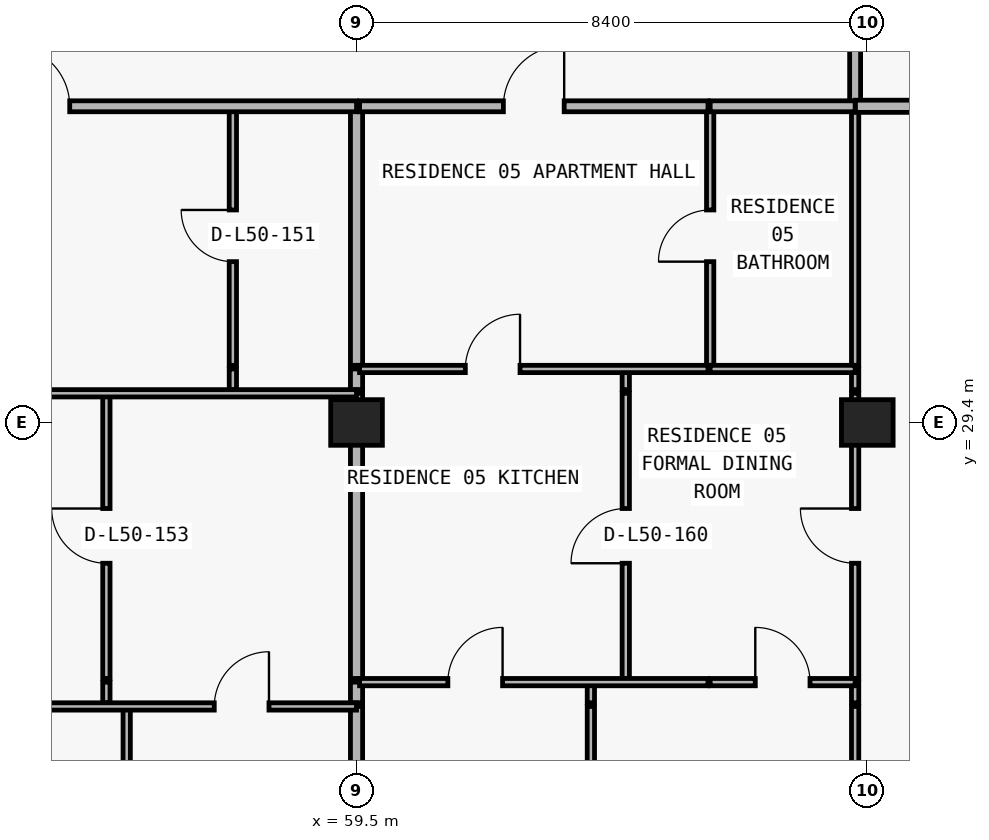
"""IFC4 building model, lengths in metres.
Left out: names, types, materials, properties, quantities, classifications, styles, units other than length and angle.
Written with IfcOpenShell. Run it as: python <this file> out.ifc"""

import sys

from ifc_helpers import new_model, si_unit, direction, frame, frame_2d, origin, origin_2d, place, context, subcontext, project, spatial, rectangle, extrude, element, fill, save


model = new_model("IFC4")
c1 = context("Model", 3, precision=1e-05, world=origin(), true_north=direction((0.0, 1.0)))
c2 = subcontext(c1, "Body", "Model", "MODEL_VIEW")
j1 = project(units=[si_unit("LENGTHUNIT", "METRE"), si_unit("PLANEANGLEUNIT", "RADIAN")], contexts=[c1])
p1 = place(None, origin())
s1 = spatial("IfcSite", under=j1, at=p1, CompositionType="ELEMENT")
p2 = place(p1, origin())
s2 = spatial("IfcBuilding", under=s1, at=p2, CompositionType="ELEMENT")
p3 = place(p2, frame((0.0, 0.0, 180.3)))
s3 = spatial("IfcBuildingStorey", under=s2, at=p3, CompositionType="ELEMENT", Elevation=180.3)
for number, where, z_axis, x_axis in (
    (1, (59.5, 29.4, 0.0), (0.0, 0.0, 1.0), (1.0, 0.0, 0.0)),
    (2, (67.9, 29.4, 0.0), (0.0, 0.0, 1.0), (1.0, 0.0, 0.0)),
):
    element("IfcColumn", number, at=place(p3, frame(where, z_axis=z_axis, x_axis=x_axis)), inside=s3, PredefinedType="COLUMN", context=c2, shape_type="SweptSolid", body=[
        extrude(rectangle(XDim=0.85, YDim=0.75, at=origin_2d()), origin(), (0.0, 0.0, 1.0), 3.0),
    ])
p4 = place(p3, frame((55.386, 24.79, 0.0), z_axis=(0.0, 0.0, 1.0), x_axis=(0.0, 1.0, 0.0)))
e3 = element("IfcWall", 3, at=p4, inside=s3, PredefinedType="PARTITIONING", context=c2, shape_type="SweptSolid", body=[
    extrude(rectangle(XDim=0.34, YDim=0.12, at=frame_2d((0.17, 0.0))), origin(), (0.0, 0.0, 1.0), 3.0),
])
p5 = place(p3, frame((55.386, 25.19, 0.0), z_axis=(0.0, 0.0, 1.0), x_axis=(0.0, 1.0, 0.0)))
e4 = element("IfcWall", 4, at=p5, inside=s3, PredefinedType="PARTITIONING", context=c2, shape_type="SweptSolid", body=[
    extrude(rectangle(XDim=4.69, YDim=0.12, at=frame_2d((2.345, 0.0))), origin(), (0.0, 0.0, 1.0), 2.675),
])
p6 = place(p5, frame((1.895, 0.0, 0.0)))
e5 = element("IfcOpeningElement", 5, at=p6, cuts=e4, PredefinedType="OPENING", context=c2, shape_type="SweptSolid", body=[
    extrude(rectangle(XDim=0.9, YDim=2.15, at=frame_2d((0.45, 1.075))), frame((0.0, 0.07, 0.0), z_axis=(0.0, -1.0, 0.0), x_axis=(1.0, 0.0, 0.0)), (0.0, 0.0, 1.0), 0.14),
])
p7 = place(p3, frame((55.72, 11.24, 0.0), z_axis=(0.0, 0.0, 1.0), x_axis=(0.0, 1.0, 0.0)))
e6 = element("IfcWall", 6, at=p7, inside=s3, PredefinedType="PARTITIONING", context=c2, shape_type="SweptSolid", body=[
    extrude(rectangle(XDim=13.49, YDim=0.12, at=frame_2d((6.745, 0.0))), origin(), (0.0, 0.0, 1.0), 3.0),
])
p8 = place(p3, frame((57.466, 29.94, 0.0), z_axis=(0.0, 0.0, 1.0), x_axis=(0.0, 1.0, 0.0)))
e7 = element("IfcWall", 7, at=p8, inside=s3, PredefinedType="PARTITIONING", context=c2, shape_type="SweptSolid", body=[
    extrude(rectangle(XDim=0.34, YDim=0.12, at=frame_2d((0.17, 0.0))), origin(), (0.0, 0.0, 1.0), 3.0),
])
p9 = place(p3, frame((57.466, 30.34, 0.0), z_axis=(0.0, 0.0, 1.0), x_axis=(0.0, 1.0, 0.0)))
e8 = element("IfcWall", 8, at=p9, inside=s3, PredefinedType="PARTITIONING", context=c2, shape_type="SweptSolid", body=[
    extrude(rectangle(XDim=4.26, YDim=0.12, at=frame_2d((2.13, 0.0))), origin(), (0.0, 0.0, 1.0), 3.0),
])
p10 = place(p9, frame((1.705, 0.0, 0.0)))
e9 = element("IfcOpeningElement", 9, at=p10, cuts=e8, PredefinedType="OPENING", context=c2, shape_type="SweptSolid", body=[
    extrude(rectangle(XDim=0.85, YDim=2.1, at=frame_2d((0.425, 1.05))), frame((0.0, 0.07, 0.0), z_axis=(0.0, -1.0, 0.0), x_axis=(1.0, 0.0, 0.0)), (0.0, 0.0, 1.0), 0.14),
])
p11 = place(p3, frame((59.5, 11.24, 0.0), z_axis=(0.0, 0.0, 1.0), x_axis=(0.0, 1.0, 0.0)))
e10 = element("IfcWall", 10, at=p11, inside=s3, PredefinedType="PARTITIONING", context=c2, shape_type="SweptSolid", body=[
    extrude(rectangle(XDim=13.49, YDim=0.2, at=frame_2d((6.745, 0.0))), origin(), (0.0, 0.0, 1.0), 2.213),
])
p12 = place(p3, frame((59.5, 24.79, 0.0), z_axis=(0.0, 0.0, 1.0), x_axis=(0.0, 1.0, 0.0)))
e11 = element("IfcWall", 11, at=p12, inside=s3, PredefinedType="PARTITIONING", context=c2, shape_type="SweptSolid", body=[
    extrude(rectangle(XDim=0.34, YDim=0.2, at=frame_2d((0.17, 0.0))), origin(), (0.0, 0.0, 1.0), 2.213),
])
p13 = place(p3, frame((59.5, 25.19, 0.0), z_axis=(0.0, 0.0, 1.0), x_axis=(0.0, 1.0, 0.0)))
e12 = element("IfcWall", 12, at=p13, inside=s3, PredefinedType="PARTITIONING", context=c2, shape_type="SweptSolid", body=[
    extrude(rectangle(XDim=4.69, YDim=0.2, at=frame_2d((2.345, 0.0))), origin(), (0.0, 0.0, 1.0), 2.213),
])
p14 = place(p3, frame((59.5, 29.94, 0.0), z_axis=(0.0, 0.0, 1.0), x_axis=(0.0, 1.0, 0.0)))
e13 = element("IfcWall", 13, at=p14, inside=s3, PredefinedType="PARTITIONING", context=c2, shape_type="SweptSolid", body=[
    extrude(rectangle(XDim=0.34, YDim=0.2, at=frame_2d((0.17, 0.0))), origin(), (0.0, 0.0, 1.0), 2.213),
])
p15 = place(p3, frame((59.5, 30.34, 0.0), z_axis=(0.0, 0.0, 1.0), x_axis=(0.0, 1.0, 0.0)))
e14 = element("IfcWall", 14, at=p15, inside=s3, PredefinedType="PARTITIONING", context=c2, shape_type="SweptSolid", body=[
    extrude(rectangle(XDim=4.26, YDim=0.2, at=frame_2d((2.13, 0.0))), origin(), (0.0, 0.0, 1.0), 2.213),
])
p16 = place(p3, frame((63.354, 11.24, 0.0), z_axis=(0.0, 0.0, 1.0), x_axis=(0.0, 1.0, 0.0)))
e15 = element("IfcWall", 15, at=p16, inside=s3, PredefinedType="PARTITIONING", context=c2, shape_type="SweptSolid", body=[
    extrude(rectangle(XDim=13.49, YDim=0.12, at=frame_2d((6.745, 0.0))), origin(), (0.0, 0.0, 1.0), 3.0),
])
p17 = place(p3, frame((63.354, 24.79, 0.0), z_axis=(0.0, 0.0, 1.0), x_axis=(0.0, 1.0, 0.0)))
e16 = element("IfcWall", 16, at=p17, inside=s3, PredefinedType="PARTITIONING", context=c2, shape_type="SweptSolid", body=[
    extrude(rectangle(XDim=0.34, YDim=0.12, at=frame_2d((0.17, 0.0))), origin(), (0.0, 0.0, 1.0), 3.0),
])
p18 = place(p3, frame((63.928, 25.19, 0.0), z_axis=(0.0, 0.0, 1.0), x_axis=(0.0, 1.0, 0.0)))
e17 = element("IfcWall", 17, at=p18, inside=s3, PredefinedType="PARTITIONING", context=c2, shape_type="SweptSolid", body=[
    extrude(rectangle(XDim=4.69, YDim=0.12, at=frame_2d((2.345, 0.0))), origin(), (0.0, 0.0, 1.0), 3.0),
])
p19 = place(p18, frame((1.895, 0.0, 0.0)))
e18 = element("IfcOpeningElement", 18, at=p19, cuts=e17, PredefinedType="OPENING", context=c2, shape_type="SweptSolid", body=[
    extrude(rectangle(XDim=0.9, YDim=2.15, at=frame_2d((0.45, 1.075))), frame((0.0, 0.07, 0.0), z_axis=(0.0, -1.0, 0.0), x_axis=(1.0, 0.0, 0.0)), (0.0, 0.0, 1.0), 0.14),
])
p20 = place(p3, frame((63.928, 29.94, 0.0), z_axis=(0.0, 0.0, 1.0), x_axis=(0.0, 1.0, 0.0)))
e19 = element("IfcWall", 19, at=p20, inside=s3, PredefinedType="PARTITIONING", context=c2, shape_type="SweptSolid", body=[
    extrude(rectangle(XDim=0.34, YDim=0.12, at=frame_2d((0.17, 0.0))), origin(), (0.0, 0.0, 1.0), 3.0),
])
p21 = place(p3, frame((65.316, 30.34, 0.0), z_axis=(0.0, 0.0, 1.0), x_axis=(0.0, 1.0, 0.0)))
e20 = element("IfcWall", 20, at=p21, inside=s3, PredefinedType="PARTITIONING", context=c2, shape_type="SweptSolid", body=[
    extrude(rectangle(XDim=4.26, YDim=0.12, at=frame_2d((2.13, 0.0))), origin(), (0.0, 0.0, 1.0), 3.0),
])
p22 = place(p21, frame((1.705, 0.0, 0.0)))
e21 = element("IfcOpeningElement", 21, at=p22, cuts=e20, PredefinedType="OPENING", context=c2, shape_type="SweptSolid", body=[
    extrude(rectangle(XDim=0.85, YDim=2.1, at=frame_2d((0.425, 1.05))), frame((0.0, 0.07, 0.0), z_axis=(0.0, -1.0, 0.0), x_axis=(1.0, 0.0, 0.0)), (0.0, 0.0, 1.0), 0.14),
])
p23 = place(p3, frame((67.7, 11.32, 0.0), z_axis=(0.0, 0.0, 1.0), x_axis=(0.0, 1.0, 0.0)))
e22 = element("IfcWall", 22, at=p23, inside=s3, PredefinedType="PARTITIONING", context=c2, shape_type="SweptSolid", body=[
    extrude(rectangle(XDim=13.41, YDim=0.12, at=frame_2d((6.705, 0.0))), origin(), (0.0, 0.0, 1.0), 2.213),
])
p24 = place(p3, frame((67.7, 24.79, 0.0), z_axis=(0.0, 0.0, 1.0), x_axis=(0.0, 1.0, 0.0)))
e23 = element("IfcWall", 23, at=p24, inside=s3, PredefinedType="PARTITIONING", context=c2, shape_type="SweptSolid", body=[
    extrude(rectangle(XDim=0.34, YDim=0.12, at=frame_2d((0.17, 0.0))), origin(), (0.0, 0.0, 1.0), 2.213),
])
p25 = place(p3, frame((67.7, 25.19, 0.0), z_axis=(0.0, 0.0, 1.0), x_axis=(0.0, 1.0, 0.0)))
e24 = element("IfcWall", 24, at=p25, inside=s3, PredefinedType="PARTITIONING", context=c2, shape_type="SweptSolid", body=[
    extrude(rectangle(XDim=4.69, YDim=0.12, at=frame_2d((2.345, 0.0))), origin(), (0.0, 0.0, 1.0), 2.213),
])
p26 = place(p25, frame((1.895, 0.0, 0.0)))
e25 = element("IfcOpeningElement", 25, at=p26, cuts=e24, PredefinedType="OPENING", context=c2, shape_type="SweptSolid", body=[
    extrude(rectangle(XDim=0.9, YDim=2.15, at=frame_2d((0.45, 1.075))), frame((0.0, 0.07, 0.0), z_axis=(0.0, -1.0, 0.0), x_axis=(1.0, 0.0, 0.0)), (0.0, 0.0, 1.0), 0.14),
])
p27 = place(p3, frame((67.7, 29.94, 0.0), z_axis=(0.0, 0.0, 1.0), x_axis=(0.0, 1.0, 0.0)))
e26 = element("IfcWall", 26, at=p27, inside=s3, PredefinedType="PARTITIONING", context=c2, shape_type="SweptSolid", body=[
    extrude(rectangle(XDim=0.34, YDim=0.12, at=frame_2d((0.17, 0.0))), origin(), (0.0, 0.0, 1.0), 2.213),
])
p28 = place(p3, frame((67.7, 30.34, 0.0), z_axis=(0.0, 0.0, 1.0), x_axis=(0.0, 1.0, 0.0)))
e27 = element("IfcWall", 27, at=p28, inside=s3, PredefinedType="PARTITIONING", context=c2, shape_type="SweptSolid", body=[
    extrude(rectangle(XDim=4.26, YDim=0.12, at=frame_2d((2.13, 0.0))), origin(), (0.0, 0.0, 1.0), 2.213),
])
p29 = place(p3, frame((67.7, 34.605, 0.0), z_axis=(0.0, 0.0, 1.0), x_axis=(0.0, 1.0, 0.0)))
e28 = element("IfcWall", 28, at=p29, inside=s3, PredefinedType="PARTITIONING", context=c2, shape_type="SweptSolid", body=[
    extrude(rectangle(XDim=2.345, YDim=0.18, at=frame_2d((1.172, 0.0))), origin(), (0.0, 0.0, 1.0), 2.213),
])
p30 = place(p3, frame((51.32, 24.73, 0.0), z_axis=(0.0, 0.0, 1.0), x_axis=(1.0, 0.0, 0.0)))
e29 = element("IfcWall", 29, at=p30, inside=s3, PredefinedType="PARTITIONING", context=c2, shape_type="SweptSolid", body=[
    extrude(rectangle(XDim=8.18, YDim=0.12, at=frame_2d((4.09, 0.0))), origin(), (0.0, 0.0, 1.0), 3.0),
])
p31 = place(p30, frame((1.583, 0.0, 0.0)))
e30 = element("IfcOpeningElement", 30, at=p31, cuts=e29, PredefinedType="OPENING", context=c2, shape_type="SweptSolid", body=[
    extrude(rectangle(XDim=0.9, YDim=2.15, at=frame_2d((0.45, 1.075))), frame((0.0, 0.07, 0.0), z_axis=(0.0, -1.0, 0.0), x_axis=(1.0, 0.0, 0.0)), (0.0, 0.0, 1.0), 0.14),
])
p32 = place(p30, frame((5.84, 0.0, 0.0)))
e31 = element("IfcOpeningElement", 31, at=p32, cuts=e29, PredefinedType="OPENING", context=c2, shape_type="SweptSolid", body=[
    extrude(rectangle(XDim=0.9, YDim=2.15, at=frame_2d((0.45, 1.075))), frame((0.0, 0.07, 0.0), z_axis=(0.0, -1.0, 0.0), x_axis=(1.0, 0.0, 0.0)), (0.0, 0.0, 1.0), 0.14),
])
p33 = place(p3, frame((59.55, 25.13, 0.0), z_axis=(0.0, 0.0, 1.0), x_axis=(1.0, 0.0, 0.0)))
e32 = element("IfcWall", 32, at=p33, inside=s3, PredefinedType="PARTITIONING", context=c2, shape_type="SweptSolid", body=[
    extrude(rectangle(XDim=5.73, YDim=0.12, at=frame_2d((2.865, 0.0))), origin(), (0.0, 0.0, 1.0), 3.0),
])
p34 = place(p33, frame((1.452, 0.0, 0.0)))
e33 = element("IfcOpeningElement", 33, at=p34, cuts=e32, PredefinedType="OPENING", context=c2, shape_type="SweptSolid", body=[
    extrude(rectangle(XDim=0.9, YDim=2.15, at=frame_2d((0.45, 1.075))), frame((0.0, 0.07, 0.0), z_axis=(0.0, -1.0, 0.0), x_axis=(1.0, 0.0, 0.0)), (0.0, 0.0, 1.0), 0.14),
])
p35 = place(p3, frame((65.316, 25.13, 0.0), z_axis=(0.0, 0.0, 1.0), x_axis=(1.0, 0.0, 0.0)))
e34 = element("IfcWall", 34, at=p35, inside=s3, PredefinedType="PARTITIONING", context=c2, shape_type="SweptSolid", body=[
    extrude(rectangle(XDim=2.384, YDim=0.12, at=frame_2d((1.192, 0.0))), origin(), (0.0, 0.0, 1.0), 3.0),
])
p36 = place(p35, frame((0.742, 0.0, 0.0)))
e35 = element("IfcOpeningElement", 35, at=p36, cuts=e34, PredefinedType="OPENING", context=c2, shape_type="SweptSolid", body=[
    extrude(rectangle(XDim=0.9, YDim=2.15, at=frame_2d((0.45, 1.075))), frame((0.0, 0.07, 0.0), z_axis=(0.0, -1.0, 0.0), x_axis=(1.0, 0.0, 0.0)), (0.0, 0.0, 1.0), 0.14),
])
p37 = place(p3, frame((51.1, 29.88, 0.0), z_axis=(0.0, 0.0, 1.0), x_axis=(1.0, 0.0, 0.0)))
e36 = element("IfcWall", 36, at=p37, inside=s3, PredefinedType="PARTITIONING", context=c2, shape_type="SweptSolid", body=[
    extrude(rectangle(XDim=8.4, YDim=0.12, at=frame_2d((4.2, 0.0))), origin(), (0.0, 0.0, 1.0), 3.0),
])
p38 = place(p37, frame((1.693, 0.0, 0.0)))
e37 = element("IfcOpeningElement", 37, at=p38, cuts=e36, PredefinedType="OPENING", context=c2, shape_type="SweptSolid", body=[
    extrude(rectangle(XDim=0.9, YDim=2.15, at=frame_2d((0.45, 1.075))), frame((0.0, 0.07, 0.0), z_axis=(0.0, -1.0, 0.0), x_axis=(1.0, 0.0, 0.0)), (0.0, 0.0, 1.0), 0.14),
])
p39 = place(p3, frame((59.55, 30.28, 0.0), z_axis=(0.0, 0.0, 1.0), x_axis=(1.0, 0.0, 0.0)))
e38 = element("IfcWall", 38, at=p39, inside=s3, PredefinedType="PARTITIONING", context=c2, shape_type="SweptSolid", body=[
    extrude(rectangle(XDim=5.73, YDim=0.12, at=frame_2d((2.865, 0.0))), origin(), (0.0, 0.0, 1.0), 3.0),
])
p40 = place(p39, frame((1.739, 0.0, 0.0)))
e39 = element("IfcOpeningElement", 39, at=p40, cuts=e38, PredefinedType="OPENING", context=c2, shape_type="SweptSolid", body=[
    extrude(rectangle(XDim=0.9, YDim=2.15, at=frame_2d((0.45, 1.075))), frame((0.0, 0.07, 0.0), z_axis=(0.0, -1.0, 0.0), x_axis=(1.0, 0.0, 0.0)), (0.0, 0.0, 1.0), 0.14),
])
p41 = place(p3, frame((65.316, 30.28, 0.0), z_axis=(0.0, 0.0, 1.0), x_axis=(1.0, 0.0, 0.0)))
e40 = element("IfcWall", 40, at=p41, inside=s3, PredefinedType="PARTITIONING", context=c2, shape_type="SweptSolid", body=[
    extrude(rectangle(XDim=2.384, YDim=0.12, at=frame_2d((1.192, 0.0))), origin(), (0.0, 0.0, 1.0), 3.0),
])
p42 = place(p3, frame((18.3, 34.6, 0.0), z_axis=(0.0, 0.0, 1.0), x_axis=(1.0, 0.0, 0.0)))
e41 = element("IfcWall", 41, at=p42, inside=s3, PredefinedType="PARTITIONING", context=c2, shape_type="SweptSolid", body=[
    extrude(rectangle(XDim=41.2, YDim=0.18, at=frame_2d((20.6, 0.0))), origin(), (0.0, 0.0, 1.0), 3.0),
])
p43 = place(p42, frame((2.67, 0.0, 0.0)))
e42 = element("IfcOpeningElement", 42, at=p43, cuts=e41, PredefinedType="OPENING", context=c2, shape_type="SweptSolid", body=[
    extrude(rectangle(XDim=1.0, YDim=2.2, at=frame_2d((0.5, 1.1))), frame((0.0, 0.1, 0.0), z_axis=(0.0, -1.0, 0.0), x_axis=(1.0, 0.0, 0.0)), (0.0, 0.0, 1.0), 0.2),
])
p44 = place(p42, frame((11.212, 0.0, 0.0)))
e43 = element("IfcOpeningElement", 43, at=p44, cuts=e41, PredefinedType="OPENING", context=c2, shape_type="SweptSolid", body=[
    extrude(rectangle(XDim=1.0, YDim=2.2, at=frame_2d((0.5, 1.1))), frame((0.0, 0.1, 0.0), z_axis=(0.0, -1.0, 0.0), x_axis=(1.0, 0.0, 0.0)), (0.0, 0.0, 1.0), 0.2),
])
p45 = place(p42, frame((35.483, 0.0, 0.0)))
e44 = element("IfcOpeningElement", 44, at=p45, cuts=e41, PredefinedType="OPENING", context=c2, shape_type="SweptSolid", body=[
    extrude(rectangle(XDim=1.0, YDim=2.2, at=frame_2d((0.5, 1.1))), frame((0.0, 0.1, 0.0), z_axis=(0.0, -1.0, 0.0), x_axis=(1.0, 0.0, 0.0)), (0.0, 0.0, 1.0), 0.2),
])
p46 = place(p3, frame((59.55, 34.6, 0.0), z_axis=(0.0, 0.0, 1.0), x_axis=(1.0, 0.0, 0.0)))
e45 = element("IfcWall", 45, at=p46, inside=s3, PredefinedType="PARTITIONING", context=c2, shape_type="SweptSolid", body=[
    extrude(rectangle(XDim=5.73, YDim=0.18, at=frame_2d((2.865, 0.0))), origin(), (0.0, 0.0, 1.0), 3.0),
])
p47 = place(p46, frame((2.365, 0.0, 0.0)))
e46 = element("IfcOpeningElement", 46, at=p47, cuts=e45, PredefinedType="OPENING", context=c2, shape_type="SweptSolid", body=[
    extrude(rectangle(XDim=1.0, YDim=2.2, at=frame_2d((0.5, 1.1))), frame((0.0, 0.1, 0.0), z_axis=(0.0, -1.0, 0.0), x_axis=(1.0, 0.0, 0.0)), (0.0, 0.0, 1.0), 0.2),
])
p48 = place(p3, frame((65.316, 34.6, 0.0), z_axis=(0.0, 0.0, 1.0), x_axis=(1.0, 0.0, 0.0)))
e47 = element("IfcWall", 47, at=p48, inside=s3, PredefinedType="PARTITIONING", context=c2, shape_type="SweptSolid", body=[
    extrude(rectangle(XDim=2.384, YDim=0.18, at=frame_2d((1.192, 0.0))), origin(), (0.0, 0.0, 1.0), 3.0),
])
p49 = place(p3, frame((67.705, 34.6, 0.0), z_axis=(0.0, 0.0, 1.0), x_axis=(1.0, 0.0, 0.0)))
e48 = element("IfcWall", 48, at=p49, inside=s3, PredefinedType="PARTITIONING", context=c2, shape_type="SweptSolid", body=[
    extrude(rectangle(XDim=3.7, YDim=0.2, at=frame_2d((1.85, 0.0))), origin(), (0.0, 0.0, 1.0), 3.0),
])
p50 = place(p45, origin())
e49 = element("IfcDoor", 49, at=p50, inside=s3, OperationType="SINGLE_SWING_LEFT", PredefinedType="DOOR", context=c2, shape_type="SweptSolid", body=[
    extrude(rectangle(XDim=1.0, YDim=2.2, at=frame_2d((0.5, 1.1))), frame((0.0, 0.025, 0.0), z_axis=(0.0, -1.0, 0.0), x_axis=(1.0, 0.0, 0.0)), (0.0, 0.0, 1.0), 0.05),
])
fill(e44, e49)
p51 = place(p10, origin())
e50 = element("IfcDoor", 50, at=p51, inside=s3, OperationType="SINGLE_SWING_RIGHT", PredefinedType="DOOR", context=c2, shape_type="SweptSolid", body=[
    extrude(rectangle(XDim=0.85, YDim=2.1, at=frame_2d((0.425, 1.05))), frame((0.0, 0.025, 0.0), z_axis=(0.0, -1.0, 0.0), x_axis=(1.0, 0.0, 0.0)), (0.0, 0.0, 1.0), 0.05),
])
fill(e9, e50)
p52 = place(p6, origin())
e51 = element("IfcDoor", 51, at=p52, inside=s3, OperationType="SINGLE_SWING_RIGHT", PredefinedType="DOOR", context=c2, shape_type="SweptSolid", body=[
    extrude(rectangle(XDim=0.9, YDim=2.15, at=frame_2d((0.45, 1.075))), frame((0.0, 0.025, 0.0), z_axis=(0.0, -1.0, 0.0), x_axis=(1.0, 0.0, 0.0)), (0.0, 0.0, 1.0), 0.05),
])
fill(e5, e51)
p53 = place(p32, origin())
e52 = element("IfcDoor", 52, at=p53, inside=s3, OperationType="SINGLE_SWING_RIGHT", PredefinedType="DOOR", context=c2, shape_type="SweptSolid", body=[
    extrude(rectangle(XDim=0.9, YDim=2.15, at=frame_2d((0.45, 1.075))), frame((0.0, 0.025, 0.0), z_axis=(0.0, -1.0, 0.0), x_axis=(1.0, 0.0, 0.0)), (0.0, 0.0, 1.0), 0.05),
])
fill(e31, e52)
p54 = place(p47, origin())
e53 = element("IfcDoor", 53, at=p54, inside=s3, OperationType="SINGLE_SWING_RIGHT", PredefinedType="DOOR", context=c2, shape_type="SweptSolid", body=[
    extrude(rectangle(XDim=1.0, YDim=2.2, at=frame_2d((0.5, 1.1))), frame((0.0, 0.025, 0.0), z_axis=(0.0, -1.0, 0.0), x_axis=(1.0, 0.0, 0.0)), (0.0, 0.0, 1.0), 0.05),
])
fill(e46, e53)
p55 = place(p22, origin())
e54 = element("IfcDoor", 54, at=p55, inside=s3, OperationType="SINGLE_SWING_LEFT", PredefinedType="DOOR", context=c2, shape_type="SweptSolid", body=[
    extrude(rectangle(XDim=0.85, YDim=2.1, at=frame_2d((0.425, 1.05))), frame((0.0, 0.025, 0.0), z_axis=(0.0, -1.0, 0.0), x_axis=(1.0, 0.0, 0.0)), (0.0, 0.0, 1.0), 0.05),
])
fill(e21, e54)
p56 = place(p40, origin())
e55 = element("IfcDoor", 55, at=p56, inside=s3, OperationType="SINGLE_SWING_RIGHT", PredefinedType="DOOR", context=c2, shape_type="SweptSolid", body=[
    extrude(rectangle(XDim=0.9, YDim=2.15, at=frame_2d((0.45, 1.075))), frame((0.0, 0.025, 0.0), z_axis=(0.0, -1.0, 0.0), x_axis=(1.0, 0.0, 0.0)), (0.0, 0.0, 1.0), 0.05),
])
fill(e39, e55)
p57 = place(p19, origin())
e56 = element("IfcDoor", 56, at=p57, inside=s3, OperationType="SINGLE_SWING_LEFT", PredefinedType="DOOR", context=c2, shape_type="SweptSolid", body=[
    extrude(rectangle(XDim=0.9, YDim=2.15, at=frame_2d((0.45, 1.075))), frame((0.0, 0.025, 0.0), z_axis=(0.0, -1.0, 0.0), x_axis=(1.0, 0.0, 0.0)), (0.0, 0.0, 1.0), 0.05),
])
fill(e18, e56)
p58 = place(p34, origin())
e57 = element("IfcDoor", 57, at=p58, inside=s3, OperationType="SINGLE_SWING_RIGHT", PredefinedType="DOOR", context=c2, shape_type="SweptSolid", body=[
    extrude(rectangle(XDim=0.9, YDim=2.15, at=frame_2d((0.45, 1.075))), frame((0.0, 0.025, 0.0), z_axis=(0.0, -1.0, 0.0), x_axis=(1.0, 0.0, 0.0)), (0.0, 0.0, 1.0), 0.05),
])
fill(e33, e57)
p59 = place(p36, origin())
e58 = element("IfcDoor", 58, at=p59, inside=s3, OperationType="SINGLE_SWING_LEFT", PredefinedType="DOOR", context=c2, shape_type="SweptSolid", body=[
    extrude(rectangle(XDim=0.9, YDim=2.15, at=frame_2d((0.45, 1.075))), frame((0.0, 0.025, 0.0), z_axis=(0.0, -1.0, 0.0), x_axis=(1.0, 0.0, 0.0)), (0.0, 0.0, 1.0), 0.05),
])
fill(e35, e58)
p60 = place(p26, origin())
e59 = element("IfcDoor", 59, at=p60, inside=s3, OperationType="SINGLE_SWING_RIGHT", PredefinedType="DOOR", context=c2, shape_type="SweptSolid", body=[
    extrude(rectangle(XDim=0.9, YDim=2.15, at=frame_2d((0.45, 1.075))), frame((0.0, 0.025, 0.0), z_axis=(0.0, -1.0, 0.0), x_axis=(1.0, 0.0, 0.0)), (0.0, 0.0, 1.0), 0.05),
])
fill(e25, e59)
save(model, sys.argv[1])
